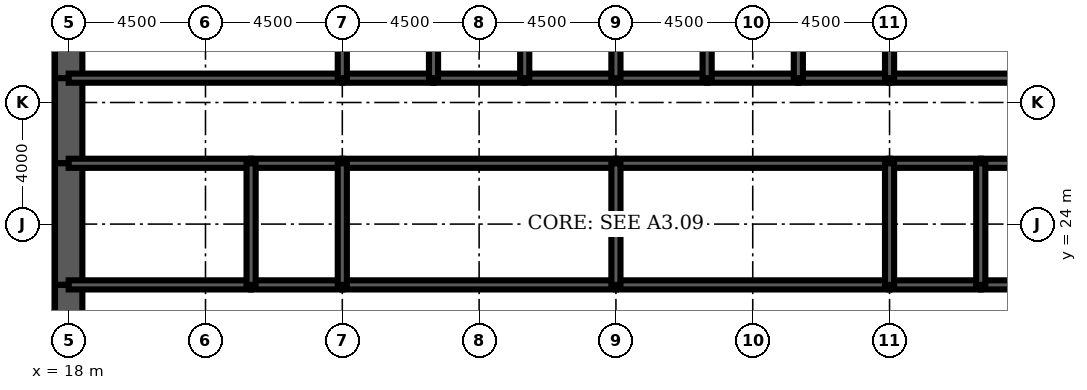
"""IFC4 building model, lengths in metres.
Left out: names, types, materials, properties, quantities, classifications, styles, units other than length and angle.
Written with IfcOpenShell. Run it as: python <this file> out.ifc"""

import sys

from ifc_helpers import new_model, si_unit, direction, frame, frame_2d, origin, place, context, subcontext, project, spatial, rectangle, extrude, element, fill, save


model = new_model("IFC4")
c1 = context("Model", 3, precision=1e-05, world=origin(), true_north=direction((0.0, 1.0)))
c2 = subcontext(c1, "Body", "Model", "MODEL_VIEW")
j1 = project(units=[si_unit("LENGTHUNIT", "METRE"), si_unit("PLANEANGLEUNIT", "RADIAN")], contexts=[c1])
p1 = place(None, origin())
s1 = spatial("IfcSite", under=j1, at=p1, CompositionType="ELEMENT")
p2 = place(p1, origin())
s2 = spatial("IfcBuilding", under=s1, at=p2, CompositionType="ELEMENT")
p3 = place(p2, frame((0.0, 0.0, 36.5)))
s3 = spatial("IfcBuildingStorey", under=s2, at=p3, CompositionType="ELEMENT", Elevation=36.5)
p4 = place(p3, frame((18.0, 32.0, 0.0), z_axis=(0.0, 0.0, 1.0), x_axis=(0.0, -1.0, 0.0)))
e1 = element("IfcWall", 1, at=p4, inside=s3, PredefinedType="SHEAR", context=c2, shape_type="SweptSolid", body=[
    extrude(rectangle(XDim=3.2, YDim=0.9, at=frame_2d((1.6, 0.0))), origin(), (0.0, 0.0, 1.0), 4.5),
])
p5 = place(p3, frame((18.0, 28.8, 0.0), z_axis=(0.0, 0.0, 1.0), x_axis=(0.0, -1.0, 0.0)))
e2 = element("IfcWall", 2, at=p5, inside=s3, PredefinedType="SHEAR", context=c2, shape_type="SweptSolid", body=[
    extrude(rectangle(XDim=2.8, YDim=0.9, at=frame_2d((1.4, 0.0))), origin(), (0.0, 0.0, 1.0), 4.5),
])
p6 = place(p5, frame((0.4, 0.0, 0.0)))
e3 = element("IfcOpeningElement", 3, at=p6, cuts=e2, PredefinedType="OPENING", context=c2, shape_type="SweptSolid", body=[
    extrude(rectangle(XDim=1.8, YDim=2.1, at=frame_2d((0.9, 1.05))), frame((0.0, 0.46, 0.0), z_axis=(0.0, -1.0, 0.0), x_axis=(1.0, 0.0, 0.0)), (0.0, 0.0, 1.0), 0.92),
])
p7 = place(p3, frame((18.0, 26.0, 0.0), z_axis=(0.0, 0.0, 1.0), x_axis=(0.0, -1.0, 0.0)))
e4 = element("IfcWall", 4, at=p7, inside=s3, PredefinedType="SHEAR", context=c2, shape_type="SweptSolid", body=[
    extrude(rectangle(XDim=4.0, YDim=0.9, at=frame_2d((2.0, 0.0))), origin(), (0.0, 0.0, 1.0), 4.5),
])
p8 = place(p3, frame((18.0, 22.0, 0.0), z_axis=(0.0, 0.0, 1.0), x_axis=(0.0, -1.0, 0.0)))
e5 = element("IfcWall", 5, at=p8, inside=s3, PredefinedType="SHEAR", context=c2, shape_type="SweptSolid", body=[
    extrude(rectangle(XDim=2.8, YDim=0.9, at=frame_2d((1.4, 0.0))), origin(), (0.0, 0.0, 1.0), 4.5),
])
p9 = place(p8, frame((0.6, 0.0, 0.0)))
e6 = element("IfcOpeningElement", 6, at=p9, cuts=e5, PredefinedType="OPENING", context=c2, shape_type="SweptSolid", body=[
    extrude(rectangle(XDim=1.8, YDim=2.1, at=frame_2d((0.9, 1.05))), frame((0.0, 0.46, 0.0), z_axis=(0.0, -1.0, 0.0), x_axis=(1.0, 0.0, 0.0)), (0.0, 0.0, 1.0), 0.92),
])
p10 = place(p3, frame((18.0, 28.8, 0.0), z_axis=(0.0, 0.0, 1.0), x_axis=(1.0, 0.0, 0.0)))
e7 = element("IfcWall", 7, at=p10, inside=s3, PredefinedType="SOLIDWALL", context=c2, shape_type="SweptSolid", body=[
    extrude(rectangle(XDim=9.0, YDim=0.3, at=frame_2d((4.5, 0.0))), origin(), (0.0, 0.0, 1.0), 4.5),
])
p11 = place(p10, frame((0.65, 0.0, 0.0)))
e8 = element("IfcOpeningElement", 8, at=p11, cuts=e7, PredefinedType="OPENING", context=c2, shape_type="SweptSolid", body=[
    extrude(rectangle(XDim=1.0, YDim=2.1, at=frame_2d((0.5, 1.05))), frame((0.0, 0.16, 0.0), z_axis=(0.0, -1.0, 0.0), x_axis=(1.0, 0.0, 0.0)), (0.0, 0.0, 1.0), 0.32),
])
p12 = place(p3, frame((27.0, 28.8, 0.0), z_axis=(0.0, 0.0, 1.0), x_axis=(1.0, 0.0, 0.0)))
e9 = element("IfcWall", 9, at=p12, inside=s3, PredefinedType="SOLIDWALL", context=c2, shape_type="SweptSolid", body=[
    extrude(rectangle(XDim=3.0, YDim=0.3, at=frame_2d((1.5, 0.0))), origin(), (0.0, 0.0, 1.0), 4.5),
])
p13 = place(p12, frame((0.95, 0.0, 0.0)))
e10 = element("IfcOpeningElement", 10, at=p13, cuts=e9, PredefinedType="OPENING", context=c2, shape_type="SweptSolid", body=[
    extrude(rectangle(XDim=1.1, YDim=2.2, at=frame_2d((0.55, 1.1))), frame((0.0, 0.16, 0.0), z_axis=(0.0, -1.0, 0.0), x_axis=(1.0, 0.0, 0.0)), (0.0, 0.0, 1.0), 0.32),
])
p14 = place(p3, frame((30.0, 28.8, 0.0), z_axis=(0.0, 0.0, 1.0), x_axis=(1.0, 0.0, 0.0)))
e11 = element("IfcWall", 11, at=p14, inside=s3, PredefinedType="SOLIDWALL", context=c2, shape_type="SweptSolid", body=[
    extrude(rectangle(XDim=3.0, YDim=0.3, at=frame_2d((1.5, 0.0))), origin(), (0.0, 0.0, 1.0), 4.5),
])
p15 = place(p14, frame((0.95, 0.0, 0.0)))
e12 = element("IfcOpeningElement", 12, at=p15, cuts=e11, PredefinedType="OPENING", context=c2, shape_type="SweptSolid", body=[
    extrude(rectangle(XDim=1.1, YDim=2.2, at=frame_2d((0.55, 1.1))), frame((0.0, 0.16, 0.0), z_axis=(0.0, -1.0, 0.0), x_axis=(1.0, 0.0, 0.0)), (0.0, 0.0, 1.0), 0.32),
])
p16 = place(p3, frame((33.0, 28.8, 0.0), z_axis=(0.0, 0.0, 1.0), x_axis=(1.0, 0.0, 0.0)))
e13 = element("IfcWall", 13, at=p16, inside=s3, PredefinedType="SOLIDWALL", context=c2, shape_type="SweptSolid", body=[
    extrude(rectangle(XDim=3.0, YDim=0.3, at=frame_2d((1.5, 0.0))), origin(), (0.0, 0.0, 1.0), 4.5),
])
p17 = place(p16, frame((0.95, 0.0, 0.0)))
e14 = element("IfcOpeningElement", 14, at=p17, cuts=e13, PredefinedType="OPENING", context=c2, shape_type="SweptSolid", body=[
    extrude(rectangle(XDim=1.1, YDim=2.2, at=frame_2d((0.55, 1.1))), frame((0.0, 0.16, 0.0), z_axis=(0.0, -1.0, 0.0), x_axis=(1.0, 0.0, 0.0)), (0.0, 0.0, 1.0), 0.32),
])
for number, where, z_axis, x_axis in (
    (15, (36.0, 28.8, 0.0), (0.0, 0.0, 1.0), (1.0, 0.0, 0.0)),
    (16, (39.0, 28.8, 0.0), (0.0, 0.0, 1.0), (1.0, 0.0, 0.0)),
):
    element("IfcWall", number, at=place(p3, frame(where, z_axis=z_axis, x_axis=x_axis)), inside=s3, PredefinedType="SOLIDWALL", context=c2, shape_type="SweptSolid", body=[
        extrude(rectangle(XDim=3.0, YDim=0.3, at=frame_2d((1.5, 0.0))), origin(), (0.0, 0.0, 1.0), 4.5),
    ])
p18 = place(p3, frame((42.0, 28.8, 0.0), z_axis=(0.0, 0.0, 1.0), x_axis=(1.0, 0.0, 0.0)))
e17 = element("IfcWall", 17, at=p18, inside=s3, PredefinedType="SOLIDWALL", context=c2, shape_type="SweptSolid", body=[
    extrude(rectangle(XDim=3.0, YDim=0.3, at=frame_2d((1.5, 0.0))), origin(), (0.0, 0.0, 1.0), 4.5),
])
p19 = place(p18, frame((0.95, 0.0, 0.0)))
e18 = element("IfcOpeningElement", 18, at=p19, cuts=e17, PredefinedType="OPENING", context=c2, shape_type="SweptSolid", body=[
    extrude(rectangle(XDim=1.1, YDim=2.2, at=frame_2d((0.55, 1.1))), frame((0.0, 0.16, 0.0), z_axis=(0.0, -1.0, 0.0), x_axis=(1.0, 0.0, 0.0)), (0.0, 0.0, 1.0), 0.32),
])
p20 = place(p3, frame((45.0, 28.8, 0.0), z_axis=(0.0, 0.0, 1.0), x_axis=(1.0, 0.0, 0.0)))
e19 = element("IfcWall", 19, at=p20, inside=s3, PredefinedType="SOLIDWALL", context=c2, shape_type="SweptSolid", body=[
    extrude(rectangle(XDim=9.0, YDim=0.3, at=frame_2d((4.5, 0.0))), origin(), (0.0, 0.0, 1.0), 4.5),
])
p21 = place(p20, frame((7.35, 0.0, 0.0)))
e20 = element("IfcOpeningElement", 20, at=p21, cuts=e19, PredefinedType="OPENING", context=c2, shape_type="SweptSolid", body=[
    extrude(rectangle(XDim=1.0, YDim=2.1, at=frame_2d((0.5, 1.05))), frame((0.0, 0.16, 0.0), z_axis=(0.0, -1.0, 0.0), x_axis=(1.0, 0.0, 0.0)), (0.0, 0.0, 1.0), 0.32),
])
p22 = place(p3, frame((18.0, 22.0, 0.0), z_axis=(0.0, 0.0, 1.0), x_axis=(1.0, 0.0, 0.0)))
e21 = element("IfcWall", 21, at=p22, inside=s3, PredefinedType="SOLIDWALL", context=c2, shape_type="SweptSolid", body=[
    extrude(rectangle(XDim=6.0, YDim=0.3, at=frame_2d((3.0, 0.0))), origin(), (0.0, 0.0, 1.0), 4.5),
])
p23 = place(p22, frame((2.0, 0.0, 0.0)))
e22 = element("IfcOpeningElement", 22, at=p23, cuts=e21, PredefinedType="OPENING", context=c2, shape_type="SweptSolid", body=[
    extrude(rectangle(XDim=1.0, YDim=2.1, at=frame_2d((0.5, 1.05))), frame((0.0, 0.16, 0.0), z_axis=(0.0, -1.0, 0.0), x_axis=(1.0, 0.0, 0.0)), (0.0, 0.0, 1.0), 0.32),
])
p24 = place(p3, frame((24.0, 22.0, 0.0), z_axis=(0.0, 0.0, 1.0), x_axis=(1.0, 0.0, 0.0)))
e23 = element("IfcWall", 23, at=p24, inside=s3, PredefinedType="SOLIDWALL", context=c2, shape_type="SweptSolid", body=[
    extrude(rectangle(XDim=3.0, YDim=0.3, at=frame_2d((1.5, 0.0))), origin(), (0.0, 0.0, 1.0), 4.5),
])
p25 = place(p24, frame((1.0, 0.0, 0.0)))
e24 = element("IfcOpeningElement", 24, at=p25, cuts=e23, PredefinedType="OPENING", context=c2, shape_type="SweptSolid", body=[
    extrude(rectangle(XDim=1.0, YDim=2.1, at=frame_2d((0.5, 1.05))), frame((0.0, 0.16, 0.0), z_axis=(0.0, -1.0, 0.0), x_axis=(1.0, 0.0, 0.0)), (0.0, 0.0, 1.0), 0.32),
])
p26 = place(p3, frame((27.0, 22.0, 0.0), z_axis=(0.0, 0.0, 1.0), x_axis=(1.0, 0.0, 0.0)))
e25 = element("IfcWall", 25, at=p26, inside=s3, PredefinedType="SOLIDWALL", context=c2, shape_type="SweptSolid", body=[
    extrude(rectangle(XDim=9.0, YDim=0.3, at=frame_2d((4.5, 0.0))), origin(), (0.0, 0.0, 1.0), 4.5),
])
p27 = place(p26, frame((4.0, 0.0, 0.0)))
e26 = element("IfcOpeningElement", 26, at=p27, cuts=e25, PredefinedType="OPENING", context=c2, shape_type="SweptSolid", body=[
    extrude(rectangle(XDim=1.0, YDim=2.1, at=frame_2d((0.5, 1.05))), frame((0.0, 0.16, 0.0), z_axis=(0.0, -1.0, 0.0), x_axis=(1.0, 0.0, 0.0)), (0.0, 0.0, 1.0), 0.32),
])
p28 = place(p3, frame((36.0, 22.0, 0.0), z_axis=(0.0, 0.0, 1.0), x_axis=(1.0, 0.0, 0.0)))
e27 = element("IfcWall", 27, at=p28, inside=s3, PredefinedType="SOLIDWALL", context=c2, shape_type="SweptSolid", body=[
    extrude(rectangle(XDim=9.0, YDim=0.3, at=frame_2d((4.5, 0.0))), origin(), (0.0, 0.0, 1.0), 4.5),
])
p29 = place(p28, frame((4.0, 0.0, 0.0)))
e28 = element("IfcOpeningElement", 28, at=p29, cuts=e27, PredefinedType="OPENING", context=c2, shape_type="SweptSolid", body=[
    extrude(rectangle(XDim=1.0, YDim=2.1, at=frame_2d((0.5, 1.05))), frame((0.0, 0.16, 0.0), z_axis=(0.0, -1.0, 0.0), x_axis=(1.0, 0.0, 0.0)), (0.0, 0.0, 1.0), 0.32),
])
p30 = place(p3, frame((45.0, 22.0, 0.0), z_axis=(0.0, 0.0, 1.0), x_axis=(1.0, 0.0, 0.0)))
e29 = element("IfcWall", 29, at=p30, inside=s3, PredefinedType="SOLIDWALL", context=c2, shape_type="SweptSolid", body=[
    extrude(rectangle(XDim=3.0, YDim=0.3, at=frame_2d((1.5, 0.0))), origin(), (0.0, 0.0, 1.0), 4.5),
])
p31 = place(p30, frame((1.0, 0.0, 0.0)))
e30 = element("IfcOpeningElement", 30, at=p31, cuts=e29, PredefinedType="OPENING", context=c2, shape_type="SweptSolid", body=[
    extrude(rectangle(XDim=1.0, YDim=2.1, at=frame_2d((0.5, 1.05))), frame((0.0, 0.16, 0.0), z_axis=(0.0, -1.0, 0.0), x_axis=(1.0, 0.0, 0.0)), (0.0, 0.0, 1.0), 0.32),
])
p32 = place(p3, frame((48.0, 22.0, 0.0), z_axis=(0.0, 0.0, 1.0), x_axis=(1.0, 0.0, 0.0)))
e31 = element("IfcWall", 31, at=p32, inside=s3, PredefinedType="SOLIDWALL", context=c2, shape_type="SweptSolid", body=[
    extrude(rectangle(XDim=6.0, YDim=0.3, at=frame_2d((3.0, 0.0))), origin(), (0.0, 0.0, 1.0), 4.5),
])
p33 = place(p32, frame((2.0, 0.0, 0.0)))
e32 = element("IfcOpeningElement", 32, at=p33, cuts=e31, PredefinedType="OPENING", context=c2, shape_type="SweptSolid", body=[
    extrude(rectangle(XDim=1.0, YDim=2.1, at=frame_2d((0.5, 1.05))), frame((0.0, 0.16, 0.0), z_axis=(0.0, -1.0, 0.0), x_axis=(1.0, 0.0, 0.0)), (0.0, 0.0, 1.0), 0.32),
])
p34 = place(p32, frame((4.15, 0.0, 0.0)))
e33 = element("IfcOpeningElement", 33, at=p34, cuts=e31, PredefinedType="OPENING", context=c2, shape_type="SweptSolid", body=[
    extrude(rectangle(XDim=1.0, YDim=2.1, at=frame_2d((0.5, 1.05))), frame((0.0, 0.16, 0.0), z_axis=(0.0, -1.0, 0.0), x_axis=(1.0, 0.0, 0.0)), (0.0, 0.0, 1.0), 0.32),
])
p35 = place(p3, frame((18.0, 26.0, 0.0), z_axis=(0.0, 0.0, 1.0), x_axis=(1.0, 0.0, 0.0)))
e34 = element("IfcWall", 34, at=p35, inside=s3, PredefinedType="SOLIDWALL", context=c2, shape_type="SweptSolid", body=[
    extrude(rectangle(XDim=6.0, YDim=0.3, at=frame_2d((3.0, 0.0))), origin(), (0.0, 0.0, 1.0), 4.5),
])
p36 = place(p3, frame((24.0, 26.0, 0.0), z_axis=(0.0, 0.0, 1.0), x_axis=(1.0, 0.0, 0.0)))
e35 = element("IfcWall", 35, at=p36, inside=s3, PredefinedType="SOLIDWALL", context=c2, shape_type="SweptSolid", body=[
    extrude(rectangle(XDim=3.0, YDim=0.3, at=frame_2d((1.5, 0.0))), origin(), (0.0, 0.0, 1.0), 4.5),
])
for number, where, z_axis, x_axis in (
    (36, (27.0, 26.0, 0.0), (0.0, 0.0, 1.0), (1.0, 0.0, 0.0)),
    (37, (36.0, 26.0, 0.0), (0.0, 0.0, 1.0), (1.0, 0.0, 0.0)),
):
    element("IfcWall", number, at=place(p3, frame(where, z_axis=z_axis, x_axis=x_axis)), inside=s3, PredefinedType="SOLIDWALL", context=c2, shape_type="SweptSolid", body=[
        extrude(rectangle(XDim=9.0, YDim=0.3, at=frame_2d((4.5, 0.0))), origin(), (0.0, 0.0, 1.0), 4.5),
    ])
p37 = place(p3, frame((45.0, 26.0, 0.0), z_axis=(0.0, 0.0, 1.0), x_axis=(1.0, 0.0, 0.0)))
e38 = element("IfcWall", 38, at=p37, inside=s3, PredefinedType="SOLIDWALL", context=c2, shape_type="SweptSolid", body=[
    extrude(rectangle(XDim=3.0, YDim=0.3, at=frame_2d((1.5, 0.0))), origin(), (0.0, 0.0, 1.0), 4.5),
])
p38 = place(p3, frame((48.0, 26.0, 0.0), z_axis=(0.0, 0.0, 1.0), x_axis=(1.0, 0.0, 0.0)))
e39 = element("IfcWall", 39, at=p38, inside=s3, PredefinedType="SOLIDWALL", context=c2, shape_type="SweptSolid", body=[
    extrude(rectangle(XDim=6.0, YDim=0.3, at=frame_2d((3.0, 0.0))), origin(), (0.0, 0.0, 1.0), 4.5),
])
for number, where, z_axis, x_axis in (
    (40, (27.0, 28.8, 0.0), (0.0, 0.0, 1.0), (0.0, 1.0, 0.0)),
    (41, (30.0, 28.8, 0.0), (0.0, 0.0, 1.0), (0.0, 1.0, 0.0)),
    (42, (33.0, 28.8, 0.0), (0.0, 0.0, 1.0), (0.0, 1.0, 0.0)),
    (43, (36.0, 28.8, 0.0), (0.0, 0.0, 1.0), (0.0, 1.0, 0.0)),
    (44, (39.0, 28.8, 0.0), (0.0, 0.0, 1.0), (0.0, 1.0, 0.0)),
    (45, (42.0, 28.8, 0.0), (0.0, 0.0, 1.0), (0.0, 1.0, 0.0)),
    (46, (45.0, 28.8, 0.0), (0.0, 0.0, 1.0), (0.0, 1.0, 0.0)),
):
    element("IfcWall", number, at=place(p3, frame(where, z_axis=z_axis, x_axis=x_axis)), inside=s3, PredefinedType="SOLIDWALL", context=c2, shape_type="SweptSolid", body=[
        extrude(rectangle(XDim=3.2, YDim=0.3, at=frame_2d((1.6, 0.0))), origin(), (0.0, 0.0, 1.0), 4.5),
    ])
for number, where, z_axis, x_axis in (
    (47, (24.0, 22.0, 0.0), (0.0, 0.0, 1.0), (0.0, 1.0, 0.0)),
    (48, (27.0, 22.0, 0.0), (0.0, 0.0, 1.0), (0.0, 1.0, 0.0)),
    (49, (36.0, 22.0, 0.0), (0.0, 0.0, 1.0), (0.0, 1.0, 0.0)),
    (50, (45.0, 22.0, 0.0), (0.0, 0.0, 1.0), (0.0, 1.0, 0.0)),
    (51, (48.0, 22.0, 0.0), (0.0, 0.0, 1.0), (0.0, 1.0, 0.0)),
):
    element("IfcWall", number, at=place(p3, frame(where, z_axis=z_axis, x_axis=x_axis)), inside=s3, PredefinedType="SOLIDWALL", context=c2, shape_type="SweptSolid", body=[
        extrude(rectangle(XDim=4.0, YDim=0.3, at=frame_2d((2.0, 0.0))), origin(), (0.0, 0.0, 1.0), 4.5),
    ])
p39 = place(p3, frame((38.5, 22.15, 0.0), z_axis=(0.0, 0.0, 1.0), x_axis=(0.0, 1.0, 0.0)))
e52 = element("IfcWall", 52, at=p39, inside=s3, PredefinedType="PARTITIONING", context=c2, shape_type="SweptSolid", body=[
    extrude(rectangle(XDim=3.7, YDim=0.15, at=frame_2d((1.85, 0.0))), origin(), (0.0, 0.0, 1.0), 3.0),
])
p40 = place(p39, frame((2.2, 0.0, 0.0)))
e53 = element("IfcOpeningElement", 53, at=p40, cuts=e52, PredefinedType="OPENING", context=c2, shape_type="SweptSolid", body=[
    extrude(rectangle(XDim=1.0, YDim=2.1, at=frame_2d((0.5, 1.05))), frame((0.0, 0.085, 0.0), z_axis=(0.0, -1.0, 0.0), x_axis=(1.0, 0.0, 0.0)), (0.0, 0.0, 1.0), 0.17),
])
p41 = place(p3, frame((47.7, 26.15, 0.0), z_axis=(0.0, 0.0, 1.0), x_axis=(0.0, 1.0, 0.0)))
e54 = element("IfcWall", 54, at=p41, inside=s3, PredefinedType="PARTITIONING", context=c2, shape_type="SweptSolid", body=[
    extrude(rectangle(XDim=2.5, YDim=0.15, at=frame_2d((1.25, 0.0))), origin(), (0.0, 0.0, 1.0), 3.0),
])
p42 = place(p41, frame((1.15, 0.0, 0.0)))
e55 = element("IfcOpeningElement", 55, at=p42, cuts=e54, PredefinedType="OPENING", context=c2, shape_type="SweptSolid", body=[
    extrude(rectangle(XDim=1.0, YDim=2.1, at=frame_2d((0.5, 1.05))), frame((0.0, 0.085, 0.0), z_axis=(0.0, -1.0, 0.0), x_axis=(1.0, 0.0, 0.0)), (0.0, 0.0, 1.0), 0.17),
])
p43 = place(p3, frame((24.5, 19.35, 0.0), z_axis=(0.0, 0.0, 1.0), x_axis=(0.0, 1.0, 0.0)))
e56 = element("IfcWall", 56, at=p43, inside=s3, PredefinedType="PARTITIONING", context=c2, shape_type="SweptSolid", body=[
    extrude(rectangle(XDim=2.5, YDim=0.15, at=frame_2d((1.25, 0.0))), origin(), (0.0, 0.0, 1.0), 3.0),
])
p44 = place(p43, frame((1.15, 0.0, 0.0)))
e57 = element("IfcOpeningElement", 57, at=p44, cuts=e56, PredefinedType="OPENING", context=c2, shape_type="SweptSolid", body=[
    extrude(rectangle(XDim=1.0, YDim=2.1, at=frame_2d((0.5, 1.05))), frame((0.0, 0.085, 0.0), z_axis=(0.0, -1.0, 0.0), x_axis=(1.0, 0.0, 0.0)), (0.0, 0.0, 1.0), 0.17),
])
p45 = place(p40, origin())
e58 = element("IfcDoor", 58, at=p45, inside=s3, OperationType="SINGLE_SWING_RIGHT", PredefinedType="DOOR", context=c2, shape_type="SweptSolid", body=[
    extrude(rectangle(XDim=1.0, YDim=2.1, at=frame_2d((0.5, 1.05))), frame((0.0, 0.025, 0.0), z_axis=(0.0, -1.0, 0.0), x_axis=(1.0, 0.0, 0.0)), (0.0, 0.0, 1.0), 0.05),
])
fill(e53, e58)
p46 = place(p42, origin())
e59 = element("IfcDoor", 59, at=p46, inside=s3, OperationType="SINGLE_SWING_RIGHT", PredefinedType="DOOR", context=c2, shape_type="SweptSolid", body=[
    extrude(rectangle(XDim=1.0, YDim=2.1, at=frame_2d((0.5, 1.05))), frame((0.0, 0.025, 0.0), z_axis=(0.0, -1.0, 0.0), x_axis=(1.0, 0.0, 0.0)), (0.0, 0.0, 1.0), 0.05),
])
fill(e55, e59)
p47 = place(p44, origin())
e60 = element("IfcDoor", 60, at=p47, inside=s3, OperationType="SINGLE_SWING_RIGHT", PredefinedType="DOOR", context=c2, shape_type="SweptSolid", body=[
    extrude(rectangle(XDim=1.0, YDim=2.1, at=frame_2d((0.5, 1.05))), frame((0.0, 0.025, 0.0), z_axis=(0.0, -1.0, 0.0), x_axis=(1.0, 0.0, 0.0)), (0.0, 0.0, 1.0), 0.05),
])
fill(e57, e60)
p48 = place(p19, origin())
e61 = element("IfcDoor", 61, at=p48, inside=s3, OperationType="DOUBLE_DOOR_SLIDING", PredefinedType="USERDEFINED", context=c2, shape_type="SweptSolid", body=[
    extrude(rectangle(XDim=1.1, YDim=2.2, at=frame_2d((0.55, 1.1))), frame((0.0, 0.025, 0.0), z_axis=(0.0, -1.0, 0.0), x_axis=(1.0, 0.0, 0.0)), (0.0, 0.0, 1.0), 0.05),
])
fill(e18, e61)
p49 = place(p13, origin())
e62 = element("IfcDoor", 62, at=p49, inside=s3, OperationType="DOUBLE_DOOR_SLIDING", PredefinedType="USERDEFINED", context=c2, shape_type="SweptSolid", body=[
    extrude(rectangle(XDim=1.1, YDim=2.2, at=frame_2d((0.55, 1.1))), frame((0.0, 0.025, 0.0), z_axis=(0.0, -1.0, 0.0), x_axis=(1.0, 0.0, 0.0)), (0.0, 0.0, 1.0), 0.05),
])
fill(e10, e62)
p50 = place(p15, origin())
e63 = element("IfcDoor", 63, at=p50, inside=s3, OperationType="DOUBLE_DOOR_SLIDING", PredefinedType="USERDEFINED", context=c2, shape_type="SweptSolid", body=[
    extrude(rectangle(XDim=1.1, YDim=2.2, at=frame_2d((0.55, 1.1))), frame((0.0, 0.025, 0.0), z_axis=(0.0, -1.0, 0.0), x_axis=(1.0, 0.0, 0.0)), (0.0, 0.0, 1.0), 0.05),
])
fill(e12, e63)
p51 = place(p17, origin())
e64 = element("IfcDoor", 64, at=p51, inside=s3, OperationType="DOUBLE_DOOR_SLIDING", PredefinedType="USERDEFINED", context=c2, shape_type="SweptSolid", body=[
    extrude(rectangle(XDim=1.1, YDim=2.2, at=frame_2d((0.55, 1.1))), frame((0.0, 0.025, 0.0), z_axis=(0.0, -1.0, 0.0), x_axis=(1.0, 0.0, 0.0)), (0.0, 0.0, 1.0), 0.05),
])
fill(e14, e64)
p52 = place(p11, origin())
e65 = element("IfcDoor", 65, at=p52, inside=s3, OperationType="SINGLE_SWING_LEFT", PredefinedType="DOOR", context=c2, shape_type="SweptSolid", body=[
    extrude(rectangle(XDim=1.0, YDim=2.1, at=frame_2d((0.5, 1.05))), frame((0.0, 0.025, 0.0), z_axis=(0.0, -1.0, 0.0), x_axis=(1.0, 0.0, 0.0)), (0.0, 0.0, 1.0), 0.05),
])
fill(e8, e65)
p53 = place(p9, origin())
e66 = element("IfcDoor", 66, at=p53, inside=s3, OperationType="SINGLE_SWING_LEFT", PredefinedType="DOOR", context=c2, shape_type="SweptSolid", body=[
    extrude(rectangle(XDim=1.8, YDim=2.1, at=frame_2d((0.9, 1.05))), frame((0.0, 0.45, 0.0), z_axis=(0.0, -1.0, 0.0), x_axis=(1.0, 0.0, 0.0)), (0.0, 0.0, 1.0), 0.899),
])
fill(e6, e66)
p54 = place(p6, origin())
e67 = element("IfcDoor", 67, at=p54, inside=s3, OperationType="SINGLE_SWING_LEFT", PredefinedType="DOOR", context=c2, shape_type="SweptSolid", body=[
    extrude(rectangle(XDim=1.8, YDim=2.1, at=frame_2d((0.9, 1.05))), frame((0.0, 0.45, 0.0), z_axis=(0.0, -1.0, 0.0), x_axis=(1.0, 0.0, 0.0)), (0.0, 0.0, 1.0), 0.899),
])
fill(e3, e67)
p55 = place(p23, origin())
e68 = element("IfcDoor", 68, at=p55, inside=s3, OperationType="SINGLE_SWING_LEFT", PredefinedType="DOOR", context=c2, shape_type="SweptSolid", body=[
    extrude(rectangle(XDim=1.0, YDim=2.1, at=frame_2d((0.5, 1.05))), frame((0.0, 0.025, 0.0), z_axis=(0.0, -1.0, 0.0), x_axis=(1.0, 0.0, 0.0)), (0.0, 0.0, 1.0), 0.05),
])
fill(e22, e68)
p56 = place(p25, origin())
e69 = element("IfcDoor", 69, at=p56, inside=s3, OperationType="SINGLE_SWING_LEFT", PredefinedType="DOOR", context=c2, shape_type="SweptSolid", body=[
    extrude(rectangle(XDim=1.0, YDim=2.1, at=frame_2d((0.5, 1.05))), frame((0.0, 0.025, 0.0), z_axis=(0.0, -1.0, 0.0), x_axis=(1.0, 0.0, 0.0)), (0.0, 0.0, 1.0), 0.05),
])
fill(e24, e69)
p57 = place(p27, origin())
e70 = element("IfcDoor", 70, at=p57, inside=s3, OperationType="SINGLE_SWING_LEFT", PredefinedType="DOOR", context=c2, shape_type="SweptSolid", body=[
    extrude(rectangle(XDim=1.0, YDim=2.1, at=frame_2d((0.5, 1.05))), frame((0.0, 0.025, 0.0), z_axis=(0.0, -1.0, 0.0), x_axis=(1.0, 0.0, 0.0)), (0.0, 0.0, 1.0), 0.05),
])
fill(e26, e70)
p58 = place(p29, origin())
e71 = element("IfcDoor", 71, at=p58, inside=s3, OperationType="SINGLE_SWING_LEFT", PredefinedType="DOOR", context=c2, shape_type="SweptSolid", body=[
    extrude(rectangle(XDim=1.0, YDim=2.1, at=frame_2d((0.5, 1.05))), frame((0.0, 0.025, 0.0), z_axis=(0.0, -1.0, 0.0), x_axis=(1.0, 0.0, 0.0)), (0.0, 0.0, 1.0), 0.05),
])
fill(e28, e71)
p59 = place(p31, origin())
e72 = element("IfcDoor", 72, at=p59, inside=s3, OperationType="SINGLE_SWING_LEFT", PredefinedType="DOOR", context=c2, shape_type="SweptSolid", body=[
    extrude(rectangle(XDim=1.0, YDim=2.1, at=frame_2d((0.5, 1.05))), frame((0.0, 0.025, 0.0), z_axis=(0.0, -1.0, 0.0), x_axis=(1.0, 0.0, 0.0)), (0.0, 0.0, 1.0), 0.05),
])
fill(e30, e72)
save(model, sys.argv[1])
